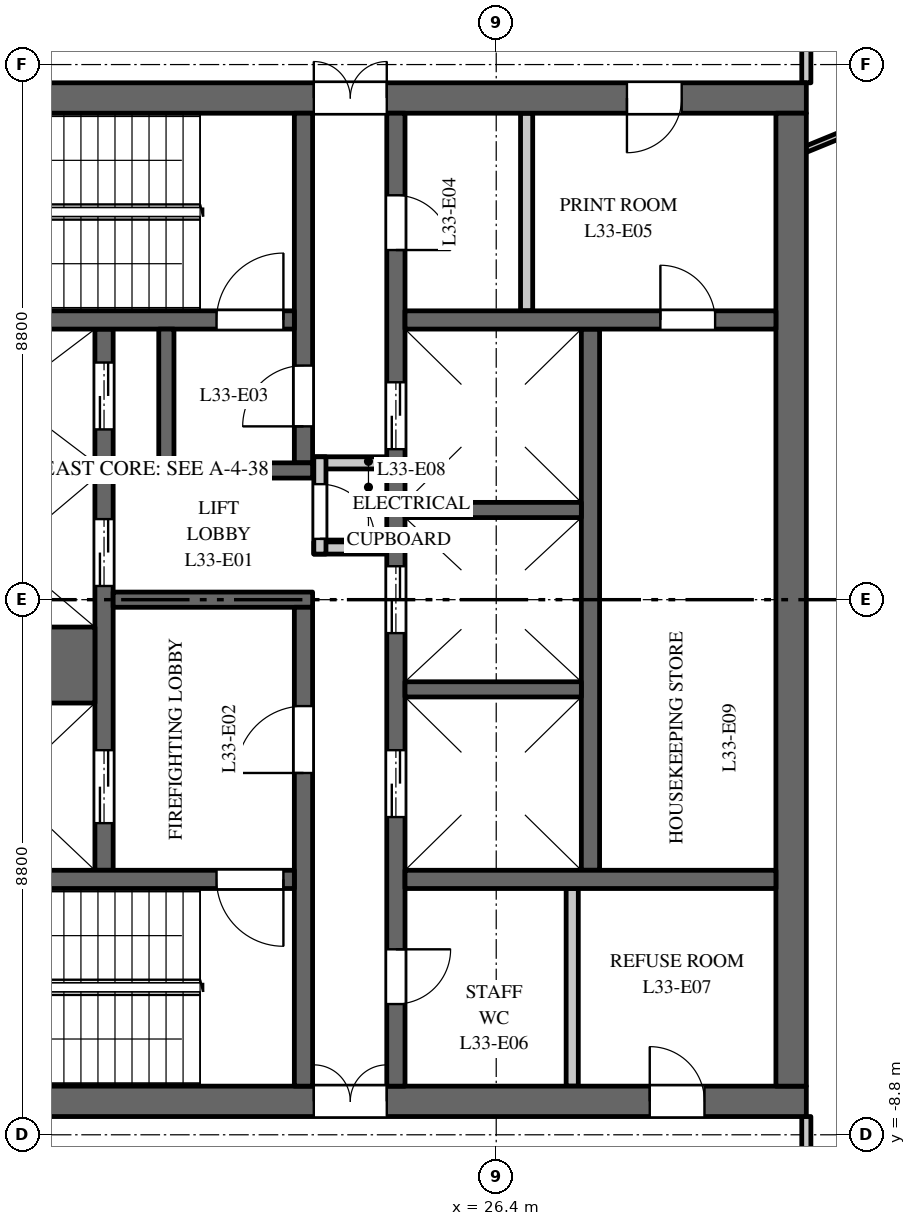
"""IFC4 building model, lengths in metres.
Left out: names, types, materials, properties, quantities, classifications, styles, units other than length and angle.
Written with IfcOpenShell. Run it as: python <this file> out.ifc"""

import sys

from ifc_helpers import new_model, si_unit, direction, frame, frame_2d, origin, place, context, subcontext, project, spatial, rectangle, extrude, element, fill, save


model = new_model("IFC4")
c1 = context("Model", 3, precision=1e-05, world=origin(), true_north=direction((0.0, 1.0)))
c2 = subcontext(c1, "Body", "Model", "MODEL_VIEW")
j1 = project(units=[si_unit("LENGTHUNIT", "METRE"), si_unit("PLANEANGLEUNIT", "RADIAN")], contexts=[c1])
p1 = place(None, origin())
s1 = spatial("IfcSite", under=j1, at=p1, CompositionType="ELEMENT")
p2 = place(p1, origin())
s2 = spatial("IfcBuilding", under=s1, at=p2, CompositionType="ELEMENT")
p3 = place(p2, frame((0.0, 0.0, 146.0)))
s3 = spatial("IfcBuildingStorey", under=s2, at=p3, CompositionType="ELEMENT", Elevation=146.0)
p4 = place(p3, frame((16.5, 8.25, 0.0), z_axis=(0.0, 0.0, 1.0), x_axis=(1.0, 0.0, 0.0)))
e1 = element("IfcWall", 1, at=p4, inside=s3, PredefinedType="SHEAR", context=c2, shape_type="SweptSolid", body=[
    extrude(rectangle(XDim=15.0, YDim=0.5, at=frame_2d((7.5, 0.0))), origin(), (0.0, 0.0, 1.0), 3.7),
])
p5 = place(p4, frame((6.9, 0.0, 0.0)))
e2 = element("IfcOpeningElement", 2, at=p5, cuts=e1, PredefinedType="OPENING", context=c2, shape_type="SweptSolid", body=[
    extrude(rectangle(XDim=1.2, YDim=2.1, at=frame_2d((0.6, 1.05))), frame((0.0, 0.26, 0.0), z_axis=(0.0, -1.0, 0.0), x_axis=(1.0, 0.0, 0.0)), (0.0, 0.0, 1.0), 0.52),
])
p6 = place(p4, frame((12.05, 0.0, 0.0)))
e3 = element("IfcOpeningElement", 3, at=p6, cuts=e1, PredefinedType="OPENING", context=c2, shape_type="SweptSolid", body=[
    extrude(rectangle(XDim=0.9, YDim=2.1, at=frame_2d((0.45, 1.05))), frame((0.0, 0.26, 0.0), z_axis=(0.0, -1.0, 0.0), x_axis=(1.0, 0.0, 0.0)), (0.0, 0.0, 1.0), 0.52),
])
p7 = place(p3, frame((16.5, -8.25, 0.0), z_axis=(0.0, 0.0, 1.0), x_axis=(1.0, 0.0, 0.0)))
e4 = element("IfcWall", 4, at=p7, inside=s3, PredefinedType="SHEAR", context=c2, shape_type="SweptSolid", body=[
    extrude(rectangle(XDim=15.0, YDim=0.5, at=frame_2d((7.5, 0.0))), origin(), (0.0, 0.0, 1.0), 3.7),
])
p8 = place(p7, frame((6.9, 0.0, 0.0)))
e5 = element("IfcOpeningElement", 5, at=p8, cuts=e4, PredefinedType="OPENING", context=c2, shape_type="SweptSolid", body=[
    extrude(rectangle(XDim=1.2, YDim=2.1, at=frame_2d((0.6, 1.05))), frame((0.0, 0.26, 0.0), z_axis=(0.0, -1.0, 0.0), x_axis=(1.0, 0.0, 0.0)), (0.0, 0.0, 1.0), 0.52),
])
p9 = place(p7, frame((12.425, 0.0, 0.0)))
e6 = element("IfcOpeningElement", 6, at=p9, cuts=e4, PredefinedType="OPENING", context=c2, shape_type="SweptSolid", body=[
    extrude(rectangle(XDim=0.9, YDim=2.1, at=frame_2d((0.45, 1.05))), frame((0.0, 0.26, 0.0), z_axis=(0.0, -1.0, 0.0), x_axis=(1.0, 0.0, 0.0)), (0.0, 0.0, 1.0), 0.52),
])
p10 = place(p3, frame((27.95, -4.45, 0.0), z_axis=(0.0, 0.0, 1.0), x_axis=(0.0, 1.0, 0.0)))
e7 = element("IfcWall", 7, at=p10, inside=s3, PredefinedType="SHEAR", context=c2, shape_type="SweptSolid", body=[
    extrude(rectangle(XDim=8.9, YDim=0.3, at=frame_2d((4.45, 0.0))), origin(), (0.0, 0.0, 1.0), 3.7),
])
p11 = place(p3, frame((19.95, -4.45, 0.0), z_axis=(0.0, 0.0, 1.0), x_axis=(0.0, 1.0, 0.0)))
e8 = element("IfcWall", 8, at=p11, inside=s3, PredefinedType="SHEAR", context=c2, shape_type="SweptSolid", body=[
    extrude(rectangle(XDim=8.9, YDim=0.3, at=frame_2d((4.45, 0.0))), origin(), (0.0, 0.0, 1.0), 3.7),
])
p12 = place(p11, frame((0.775, 0.0, 0.0)))
e9 = element("IfcOpeningElement", 9, at=p12, cuts=e8, PredefinedType="OPENING", context=c2, shape_type="SweptSolid", body=[
    extrude(rectangle(XDim=1.2, YDim=2.1, at=frame_2d((0.6, 1.05))), frame((0.0, 0.16, 0.0), z_axis=(0.0, -1.0, 0.0), x_axis=(1.0, 0.0, 0.0)), (0.0, 0.0, 1.0), 0.32),
])
p13 = place(p11, frame((4.675, 0.0, 0.0)))
e10 = element("IfcOpeningElement", 10, at=p13, cuts=e8, PredefinedType="OPENING", context=c2, shape_type="SweptSolid", body=[
    extrude(rectangle(XDim=1.1, YDim=2.1, at=frame_2d((0.55, 1.05))), frame((0.0, 0.16, 0.0), z_axis=(0.0, -1.0, 0.0), x_axis=(1.0, 0.0, 0.0)), (0.0, 0.0, 1.0), 0.32),
])
p14 = place(p11, frame((7.25, 0.0, 0.0)))
e11 = element("IfcOpeningElement", 11, at=p14, cuts=e8, PredefinedType="OPENING", context=c2, shape_type="SweptSolid", body=[
    extrude(rectangle(XDim=1.1, YDim=2.1, at=frame_2d((0.55, 1.05))), frame((0.0, 0.16, 0.0), z_axis=(0.0, -1.0, 0.0), x_axis=(1.0, 0.0, 0.0)), (0.0, 0.0, 1.0), 0.32),
])
p15 = place(p3, frame((24.75, -8.0, 0.0), z_axis=(0.0, 0.0, 1.0), x_axis=(0.0, 1.0, 0.0)))
e12 = element("IfcWall", 12, at=p15, inside=s3, PredefinedType="SHEAR", context=c2, shape_type="SweptSolid", body=[
    extrude(rectangle(XDim=16.0, YDim=0.3, at=frame_2d((8.0, 0.0))), origin(), (0.0, 0.0, 1.0), 3.7),
])
p16 = place(p15, frame((4.425, 0.0, 0.0)))
e13 = element("IfcOpeningElement", 13, at=p16, cuts=e12, PredefinedType="OPENING", context=c2, shape_type="SweptSolid", body=[
    extrude(rectangle(XDim=1.1, YDim=2.1, at=frame_2d((0.55, 1.05))), frame((0.0, 0.16, 0.0), z_axis=(0.0, -1.0, 0.0), x_axis=(1.0, 0.0, 0.0)), (0.0, 0.0, 1.0), 0.32),
])
p17 = place(p15, frame((7.45, 0.0, 0.0)))
e14 = element("IfcOpeningElement", 14, at=p17, cuts=e12, PredefinedType="OPENING", context=c2, shape_type="SweptSolid", body=[
    extrude(rectangle(XDim=1.1, YDim=2.1, at=frame_2d((0.55, 1.05))), frame((0.0, 0.16, 0.0), z_axis=(0.0, -1.0, 0.0), x_axis=(1.0, 0.0, 0.0)), (0.0, 0.0, 1.0), 0.32),
])
p18 = place(p15, frame((10.475, 0.0, 0.0)))
e15 = element("IfcOpeningElement", 15, at=p18, cuts=e12, PredefinedType="OPENING", context=c2, shape_type="SweptSolid", body=[
    extrude(rectangle(XDim=1.1, YDim=2.1, at=frame_2d((0.55, 1.05))), frame((0.0, 0.16, 0.0), z_axis=(0.0, -1.0, 0.0), x_axis=(1.0, 0.0, 0.0)), (0.0, 0.0, 1.0), 0.32),
])
p19 = place(p15, frame((13.75, 0.0, 0.0)))
e16 = element("IfcOpeningElement", 16, at=p19, cuts=e12, PredefinedType="OPENING", context=c2, shape_type="SweptSolid", body=[
    extrude(rectangle(XDim=0.9, YDim=2.1, at=frame_2d((0.45, 1.05))), frame((0.0, 0.16, 0.0), z_axis=(0.0, -1.0, 0.0), x_axis=(1.0, 0.0, 0.0)), (0.0, 0.0, 1.0), 0.32),
])
p20 = place(p15, frame((1.35, 0.0, 0.0)))
e17 = element("IfcOpeningElement", 17, at=p20, cuts=e12, PredefinedType="OPENING", context=c2, shape_type="SweptSolid", body=[
    extrude(rectangle(XDim=0.9, YDim=2.1, at=frame_2d((0.45, 1.05))), frame((0.0, 0.16, 0.0), z_axis=(0.0, -1.0, 0.0), x_axis=(1.0, 0.0, 0.0)), (0.0, 0.0, 1.0), 0.32),
])
p21 = place(p3, frame((20.1, 0.0, 0.0), z_axis=(0.0, 0.0, 1.0), x_axis=(1.0, 0.0, 0.0)))
e18 = element("IfcWall", 18, at=p21, inside=s3, PredefinedType="SHEAR", context=c2, shape_type="SweptSolid", body=[
    extrude(rectangle(XDim=3.28, YDim=0.25, at=frame_2d((1.64, 0.0))), origin(), (0.0, 0.0, 1.0), 3.7),
])
for number, where, z_axis, x_axis in (
    (19, (23.4, 0.85, 0.0), (0.0, 0.0, 1.0), (1.0, 0.0, 0.0)),
    (20, (23.4, 2.25, 0.0), (0.0, 0.0, 1.0), (1.0, 0.0, 0.0)),
):
    element("IfcWall", number, at=place(p3, frame(where, z_axis=z_axis, x_axis=x_axis)), inside=s3, PredefinedType="PARTITIONING", context=c2, shape_type="SweptSolid", body=[
        extrude(rectangle(XDim=1.2, YDim=0.2, at=frame_2d((0.6, 0.0))), origin(), (0.0, 0.0, 1.0), 3.7),
    ])
p22 = place(p3, frame((23.5, 0.75, 0.0), z_axis=(0.0, 0.0, 1.0), x_axis=(0.0, 1.0, 0.0)))
e21 = element("IfcWall", 21, at=p22, inside=s3, PredefinedType="PARTITIONING", context=c2, shape_type="SweptSolid", body=[
    extrude(rectangle(XDim=1.6, YDim=0.2, at=frame_2d((0.8, 0.0))), origin(), (0.0, 0.0, 1.0), 3.7),
])
p23 = place(p22, frame((0.25, 0.0, 0.0)))
e22 = element("IfcOpeningElement", 22, at=p23, cuts=e21, PredefinedType="OPENING", context=c2, shape_type="SweptSolid", body=[
    extrude(rectangle(XDim=0.9, YDim=2.1, at=frame_2d((0.45, 1.05))), frame((0.0, 0.11, 0.0), z_axis=(0.0, -1.0, 0.0), x_axis=(1.0, 0.0, 0.0)), (0.0, 0.0, 1.0), 0.22),
])
p24 = place(p3, frame((31.25, -8.0, 0.0), z_axis=(0.0, 0.0, 1.0), x_axis=(0.0, 1.0, 0.0)))
e23 = element("IfcWall", 23, at=p24, inside=s3, PredefinedType="SHEAR", context=c2, shape_type="SweptSolid", body=[
    extrude(rectangle(XDim=16.0, YDim=0.5, at=frame_2d((8.0, 0.0))), origin(), (0.0, 0.0, 1.0), 3.7),
])
p25 = place(p3, frame((24.9, 4.6, 0.0), z_axis=(0.0, 0.0, 1.0), x_axis=(1.0, 0.0, 0.0)))
e24 = element("IfcWall", 24, at=p25, inside=s3, PredefinedType="SHEAR", context=c2, shape_type="SweptSolid", body=[
    extrude(rectangle(XDim=6.1, YDim=0.3, at=frame_2d((3.05, 0.0))), origin(), (0.0, 0.0, 1.0), 3.7),
])
p26 = place(p25, frame((4.2, 0.0, 0.0)))
e25 = element("IfcOpeningElement", 25, at=p26, cuts=e24, PredefinedType="OPENING", context=c2, shape_type="SweptSolid", body=[
    extrude(rectangle(XDim=0.9, YDim=2.1, at=frame_2d((0.45, 1.05))), frame((0.0, 0.16, 0.0), z_axis=(0.0, -1.0, 0.0), x_axis=(1.0, 0.0, 0.0)), (0.0, 0.0, 1.0), 0.32),
])
for number, where, z_axis, x_axis in (
    (26, (26.9, 4.75, 0.0), (0.0, 0.0, 1.0), (0.0, 1.0, 0.0)),
    (27, (27.65, -8.0, 0.0), (0.0, 0.0, 1.0), (0.0, 1.0, 0.0)),
):
    element("IfcWall", number, at=place(p3, frame(where, z_axis=z_axis, x_axis=x_axis)), inside=s3, PredefinedType="PARTITIONING", context=c2, shape_type="SweptSolid", body=[
        extrude(rectangle(XDim=3.25, YDim=0.2, at=frame_2d((1.625, 0.0))), origin(), (0.0, 0.0, 1.0), 3.7),
    ])
p27 = place(p3, frame((24.9, -4.6, 0.0), z_axis=(0.0, 0.0, 1.0), x_axis=(1.0, 0.0, 0.0)))
e28 = element("IfcWall", 28, at=p27, inside=s3, PredefinedType="SHEAR", context=c2, shape_type="SweptSolid", body=[
    extrude(rectangle(XDim=6.1, YDim=0.3, at=frame_2d((3.05, 0.0))), origin(), (0.0, 0.0, 1.0), 3.7),
])
p28 = place(p3, frame((16.9, -1.075, 0.0), z_axis=(0.0, 0.0, 1.0), x_axis=(1.0, 0.0, 0.0)))
e29 = element("IfcWall", 29, at=p28, inside=s3, PredefinedType="SHEAR", context=c2, shape_type="SweptSolid", body=[
    extrude(rectangle(XDim=2.9, YDim=1.25, at=frame_2d((1.45, 0.0))), origin(), (0.0, 0.0, 1.0), 3.7),
])
for number, where, z_axis, x_axis in (
    (30, (16.9, 2.125, 0.0), (0.0, 0.0, 1.0), (1.0, 0.0, 0.0)),
    (31, (24.9, -1.475, 0.0), (0.0, 0.0, 1.0), (1.0, 0.0, 0.0)),
    (32, (24.9, 1.475, 0.0), (0.0, 0.0, 1.0), (1.0, 0.0, 0.0)),
):
    element("IfcWall", number, at=place(p3, frame(where, z_axis=z_axis, x_axis=x_axis)), inside=s3, PredefinedType="SHEAR", context=c2, shape_type="SweptSolid", body=[
        extrude(rectangle(XDim=2.9, YDim=0.25, at=frame_2d((1.45, 0.0))), origin(), (0.0, 0.0, 1.0), 3.7),
    ])
p29 = place(p3, frame((23.23, 2.25, 0.0), z_axis=(0.0, 0.0, 1.0), x_axis=(0.0, 1.0, 0.0)))
e33 = element("IfcWall", 33, at=p29, inside=s3, PredefinedType="SHEAR", context=c2, shape_type="SweptSolid", body=[
    extrude(rectangle(XDim=5.75, YDim=0.3, at=frame_2d((2.875, 0.0))), origin(), (0.0, 0.0, 1.0), 3.7),
])
p30 = place(p29, frame((0.6, 0.0, 0.0)))
e34 = element("IfcOpeningElement", 34, at=p30, cuts=e33, PredefinedType="OPENING", context=c2, shape_type="SweptSolid", body=[
    extrude(rectangle(XDim=1.0, YDim=2.1, at=frame_2d((0.5, 1.05))), frame((0.0, 0.16, 0.0), z_axis=(0.0, -1.0, 0.0), x_axis=(1.0, 0.0, 0.0)), (0.0, 0.0, 1.0), 0.32),
])
p31 = place(p3, frame((23.23, -8.0, 0.0), z_axis=(0.0, 0.0, 1.0), x_axis=(0.0, 1.0, 0.0)))
e35 = element("IfcWall", 35, at=p31, inside=s3, PredefinedType="SHEAR", context=c2, shape_type="SweptSolid", body=[
    extrude(rectangle(XDim=7.875, YDim=0.3, at=frame_2d((3.938, 0.0))), origin(), (0.0, 0.0, 1.0), 3.7),
])
p32 = place(p31, frame((5.15, 0.0, 0.0)))
e36 = element("IfcOpeningElement", 36, at=p32, cuts=e35, PredefinedType="OPENING", context=c2, shape_type="SweptSolid", body=[
    extrude(rectangle(XDim=1.1, YDim=2.1, at=frame_2d((0.55, 1.05))), frame((0.0, 0.16, 0.0), z_axis=(0.0, -1.0, 0.0), x_axis=(1.0, 0.0, 0.0)), (0.0, 0.0, 1.0), 0.32),
])
p33 = place(p3, frame((16.9, 4.6, 0.0), z_axis=(0.0, 0.0, 1.0), x_axis=(1.0, 0.0, 0.0)))
e37 = element("IfcWall", 37, at=p33, inside=s3, PredefinedType="SHEAR", context=c2, shape_type="SweptSolid", body=[
    extrude(rectangle(XDim=6.18, YDim=0.3, at=frame_2d((3.09, 0.0))), origin(), (0.0, 0.0, 1.0), 3.7),
])
p34 = place(p33, frame((4.9, 0.0, 0.0)))
e38 = element("IfcOpeningElement", 38, at=p34, cuts=e37, PredefinedType="OPENING", context=c2, shape_type="SweptSolid", body=[
    extrude(rectangle(XDim=1.1, YDim=2.1, at=frame_2d((0.55, 1.05))), frame((0.0, 0.16, 0.0), z_axis=(0.0, -1.0, 0.0), x_axis=(1.0, 0.0, 0.0)), (0.0, 0.0, 1.0), 0.32),
])
p35 = place(p3, frame((16.9, -4.6, 0.0), z_axis=(0.0, 0.0, 1.0), x_axis=(1.0, 0.0, 0.0)))
e39 = element("IfcWall", 39, at=p35, inside=s3, PredefinedType="SHEAR", context=c2, shape_type="SweptSolid", body=[
    extrude(rectangle(XDim=6.18, YDim=0.3, at=frame_2d((3.09, 0.0))), origin(), (0.0, 0.0, 1.0), 3.7),
])
p36 = place(p35, frame((4.9, 0.0, 0.0)))
e40 = element("IfcOpeningElement", 40, at=p36, cuts=e39, PredefinedType="OPENING", context=c2, shape_type="SweptSolid", body=[
    extrude(rectangle(XDim=1.1, YDim=2.1, at=frame_2d((0.55, 1.05))), frame((0.0, 0.16, 0.0), z_axis=(0.0, -1.0, 0.0), x_axis=(1.0, 0.0, 0.0)), (0.0, 0.0, 1.0), 0.32),
])
p37 = place(p3, frame((20.85, 2.125, 0.0), z_axis=(0.0, 0.0, 1.0), x_axis=(1.0, 0.0, 0.0)))
e41 = element("IfcWall", 41, at=p37, inside=s3, PredefinedType="SHEAR", context=c2, shape_type="SweptSolid", body=[
    extrude(rectangle(XDim=2.53, YDim=0.25, at=frame_2d((1.265, 0.0))), origin(), (0.0, 0.0, 1.0), 3.7),
])
p38 = place(p3, frame((20.975, 2.25, 0.0), z_axis=(0.0, 0.0, 1.0), x_axis=(0.0, 1.0, 0.0)))
e42 = element("IfcWall", 42, at=p38, inside=s3, PredefinedType="SHEAR", context=c2, shape_type="SweptSolid", body=[
    extrude(rectangle(XDim=2.2, YDim=0.25, at=frame_2d((1.1, 0.0))), origin(), (0.0, 0.0, 1.0), 3.7),
])
p39 = place(p3, frame((31.5, -10.7, 0.0), z_axis=(0.0, 0.0, 1.0), x_axis=(0.0, 1.0, 0.0)))
e43 = element("IfcWall", 43, at=p39, inside=s3, PredefinedType="PARTITIONING", context=c2, shape_type="SweptSolid", body=[
    extrude(rectangle(XDim=2.2, YDim=0.15, at=frame_2d((1.1, 0.0))), origin(), (0.0, 0.0, 1.0), 2.9),
])
p40 = place(p3, frame((31.5, 7.41, 0.0), z_axis=(0.0, 0.0, 1.0), x_axis=(0.925344112436, 0.379128307542, 0.0)))
e44 = element("IfcWall", 44, at=p40, inside=s3, PredefinedType="PARTITIONING", context=c2, shape_type="SweptSolid", body=[
    extrude(rectangle(XDim=2.954, YDim=0.1, at=frame_2d((1.477, 0.0))), origin(), (0.0, 0.0, 1.0), 3.7),
])
p41 = place(p3, frame((31.5, 8.5, 0.0), z_axis=(0.0, 0.0, 1.0), x_axis=(0.0, 1.0, 0.0)))
e45 = element("IfcWall", 45, at=p41, inside=s3, PredefinedType="PARTITIONING", context=c2, shape_type="SweptSolid", body=[
    extrude(rectangle(XDim=2.2, YDim=0.15, at=frame_2d((1.1, 0.0))), origin(), (0.0, 0.0, 1.0), 2.9),
])
p42 = place(p12, origin())
e46 = element("IfcDoor", 46, at=p42, inside=s3, OperationType="DOUBLE_DOOR_SLIDING", PredefinedType="DOOR", context=c2, shape_type="SweptSolid", body=[
    extrude(rectangle(XDim=1.2, YDim=2.1, at=frame_2d((0.6, 1.05))), frame((0.0, 0.025, 0.0), z_axis=(0.0, -1.0, 0.0), x_axis=(1.0, 0.0, 0.0)), (0.0, 0.0, 1.0), 0.05),
])
fill(e9, e46)
p43 = place(p13, origin())
e47 = element("IfcDoor", 47, at=p43, inside=s3, OperationType="DOUBLE_DOOR_SLIDING", PredefinedType="DOOR", context=c2, shape_type="SweptSolid", body=[
    extrude(rectangle(XDim=1.1, YDim=2.1, at=frame_2d((0.55, 1.05))), frame((0.0, 0.025, 0.0), z_axis=(0.0, -1.0, 0.0), x_axis=(1.0, 0.0, 0.0)), (0.0, 0.0, 1.0), 0.05),
])
fill(e10, e47)
p44 = place(p14, origin())
e48 = element("IfcDoor", 48, at=p44, inside=s3, OperationType="DOUBLE_DOOR_SLIDING", PredefinedType="DOOR", context=c2, shape_type="SweptSolid", body=[
    extrude(rectangle(XDim=1.1, YDim=2.1, at=frame_2d((0.55, 1.05))), frame((0.0, 0.025, 0.0), z_axis=(0.0, -1.0, 0.0), x_axis=(1.0, 0.0, 0.0)), (0.0, 0.0, 1.0), 0.05),
])
fill(e11, e48)
p45 = place(p16, origin())
e49 = element("IfcDoor", 49, at=p45, inside=s3, OperationType="DOUBLE_DOOR_SLIDING", PredefinedType="DOOR", context=c2, shape_type="SweptSolid", body=[
    extrude(rectangle(XDim=1.1, YDim=2.1, at=frame_2d((0.55, 1.05))), frame((0.0, 0.025, 0.0), z_axis=(0.0, -1.0, 0.0), x_axis=(1.0, 0.0, 0.0)), (0.0, 0.0, 1.0), 0.05),
])
fill(e13, e49)
p46 = place(p17, origin())
e50 = element("IfcDoor", 50, at=p46, inside=s3, OperationType="DOUBLE_DOOR_SLIDING", PredefinedType="DOOR", context=c2, shape_type="SweptSolid", body=[
    extrude(rectangle(XDim=1.1, YDim=2.1, at=frame_2d((0.55, 1.05))), frame((0.0, 0.025, 0.0), z_axis=(0.0, -1.0, 0.0), x_axis=(1.0, 0.0, 0.0)), (0.0, 0.0, 1.0), 0.05),
])
fill(e14, e50)
p47 = place(p18, origin())
e51 = element("IfcDoor", 51, at=p47, inside=s3, OperationType="DOUBLE_DOOR_SLIDING", PredefinedType="DOOR", context=c2, shape_type="SweptSolid", body=[
    extrude(rectangle(XDim=1.1, YDim=2.1, at=frame_2d((0.55, 1.05))), frame((0.0, 0.025, 0.0), z_axis=(0.0, -1.0, 0.0), x_axis=(1.0, 0.0, 0.0)), (0.0, 0.0, 1.0), 0.05),
])
fill(e15, e51)
p48 = place(p34, origin())
e52 = element("IfcDoor", 52, at=p48, inside=s3, OperationType="SINGLE_SWING_LEFT", PredefinedType="DOOR", context=c2, shape_type="SweptSolid", body=[
    extrude(rectangle(XDim=1.1, YDim=2.1, at=frame_2d((0.55, 1.05))), frame((0.0, 0.025, 0.0), z_axis=(0.0, -1.0, 0.0), x_axis=(1.0, 0.0, 0.0)), (0.0, 0.0, 1.0), 0.05),
])
fill(e38, e52)
p49 = place(p36, origin())
e53 = element("IfcDoor", 53, at=p49, inside=s3, OperationType="SINGLE_SWING_RIGHT", PredefinedType="DOOR", context=c2, shape_type="SweptSolid", body=[
    extrude(rectangle(XDim=1.1, YDim=2.1, at=frame_2d((0.55, 1.05))), frame((0.0, 0.025, 0.0), z_axis=(0.0, -1.0, 0.0), x_axis=(1.0, 0.0, 0.0)), (0.0, 0.0, 1.0), 0.05),
])
fill(e40, e53)
p50 = place(p32, origin())
e54 = element("IfcDoor", 54, at=p50, inside=s3, OperationType="SINGLE_SWING_RIGHT", PredefinedType="DOOR", context=c2, shape_type="SweptSolid", body=[
    extrude(rectangle(XDim=1.1, YDim=2.1, at=frame_2d((0.55, 1.05))), frame((0.0, 0.025, 0.0), z_axis=(0.0, -1.0, 0.0), x_axis=(1.0, 0.0, 0.0)), (0.0, 0.0, 1.0), 0.05),
])
fill(e36, e54)
p51 = place(p30, origin())
e55 = element("IfcDoor", 55, at=p51, inside=s3, OperationType="SINGLE_SWING_RIGHT", PredefinedType="DOOR", context=c2, shape_type="SweptSolid", body=[
    extrude(rectangle(XDim=1.0, YDim=2.1, at=frame_2d((0.5, 1.05))), frame((0.0, 0.025, 0.0), z_axis=(0.0, -1.0, 0.0), x_axis=(1.0, 0.0, 0.0)), (0.0, 0.0, 1.0), 0.05),
])
fill(e34, e55)
p52 = place(p5, origin())
e56 = element("IfcDoor", 56, at=p52, inside=s3, OperationType="DOUBLE_DOOR_DOUBLE_SWING", PredefinedType="DOOR", context=c2, shape_type="SweptSolid", body=[
    extrude(rectangle(XDim=1.2, YDim=2.1, at=frame_2d((0.6, 1.05))), frame((0.0, 0.025, 0.0), z_axis=(0.0, -1.0, 0.0), x_axis=(1.0, 0.0, 0.0)), (0.0, 0.0, 1.0), 0.05),
])
fill(e2, e56)
p53 = place(p8, origin())
e57 = element("IfcDoor", 57, at=p53, inside=s3, OperationType="DOUBLE_DOOR_DOUBLE_SWING", PredefinedType="DOOR", context=c2, shape_type="SweptSolid", body=[
    extrude(rectangle(XDim=1.2, YDim=2.1, at=frame_2d((0.6, 1.05))), frame((0.0, 0.025, 0.0), z_axis=(0.0, -1.0, 0.0), x_axis=(1.0, 0.0, 0.0)), (0.0, 0.0, 1.0), 0.05),
])
fill(e5, e57)
p54 = place(p19, origin())
e58 = element("IfcDoor", 58, at=p54, inside=s3, OperationType="SINGLE_SWING_LEFT", PredefinedType="DOOR", context=c2, shape_type="SweptSolid", body=[
    extrude(rectangle(XDim=0.9, YDim=2.1, at=frame_2d((0.45, 1.05))), frame((0.0, 0.025, 0.0), z_axis=(0.0, -1.0, 0.0), x_axis=(1.0, 0.0, 0.0)), (0.0, 0.0, 1.0), 0.05),
])
fill(e16, e58)
p55 = place(p6, origin())
e59 = element("IfcDoor", 59, at=p55, inside=s3, OperationType="SINGLE_SWING_LEFT", PredefinedType="DOOR", context=c2, shape_type="SweptSolid", body=[
    extrude(rectangle(XDim=0.9, YDim=2.1, at=frame_2d((0.45, 1.05))), frame((0.0, 0.025, 0.0), z_axis=(0.0, -1.0, 0.0), x_axis=(1.0, 0.0, 0.0)), (0.0, 0.0, 1.0), 0.05),
])
fill(e3, e59)
p56 = place(p20, origin())
e60 = element("IfcDoor", 60, at=p56, inside=s3, OperationType="SINGLE_SWING_RIGHT", PredefinedType="DOOR", context=c2, shape_type="SweptSolid", body=[
    extrude(rectangle(XDim=0.9, YDim=2.1, at=frame_2d((0.45, 1.05))), frame((0.0, 0.025, 0.0), z_axis=(0.0, -1.0, 0.0), x_axis=(1.0, 0.0, 0.0)), (0.0, 0.0, 1.0), 0.05),
])
fill(e17, e60)
p57 = place(p9, origin())
e61 = element("IfcDoor", 61, at=p57, inside=s3, OperationType="SINGLE_SWING_RIGHT", PredefinedType="DOOR", context=c2, shape_type="SweptSolid", body=[
    extrude(rectangle(XDim=0.9, YDim=2.1, at=frame_2d((0.45, 1.05))), frame((0.0, 0.025, 0.0), z_axis=(0.0, -1.0, 0.0), x_axis=(1.0, 0.0, 0.0)), (0.0, 0.0, 1.0), 0.05),
])
fill(e6, e61)
p58 = place(p23, origin())
e62 = element("IfcDoor", 62, at=p58, inside=s3, OperationType="SINGLE_SWING_LEFT", PredefinedType="DOOR", context=c2, shape_type="SweptSolid", body=[
    extrude(rectangle(XDim=0.9, YDim=2.1, at=frame_2d((0.45, 1.05))), frame((0.0, 0.025, 0.0), z_axis=(0.0, -1.0, 0.0), x_axis=(1.0, 0.0, 0.0)), (0.0, 0.0, 1.0), 0.05),
])
fill(e22, e62)
p59 = place(p26, origin())
e63 = element("IfcDoor", 63, at=p59, inside=s3, OperationType="SINGLE_SWING_RIGHT", PredefinedType="DOOR", context=c2, shape_type="SweptSolid", body=[
    extrude(rectangle(XDim=0.9, YDim=2.1, at=frame_2d((0.45, 1.05))), frame((0.0, 0.025, 0.0), z_axis=(0.0, -1.0, 0.0), x_axis=(1.0, 0.0, 0.0)), (0.0, 0.0, 1.0), 0.05),
])
fill(e25, e63)
save(model, sys.argv[1])
